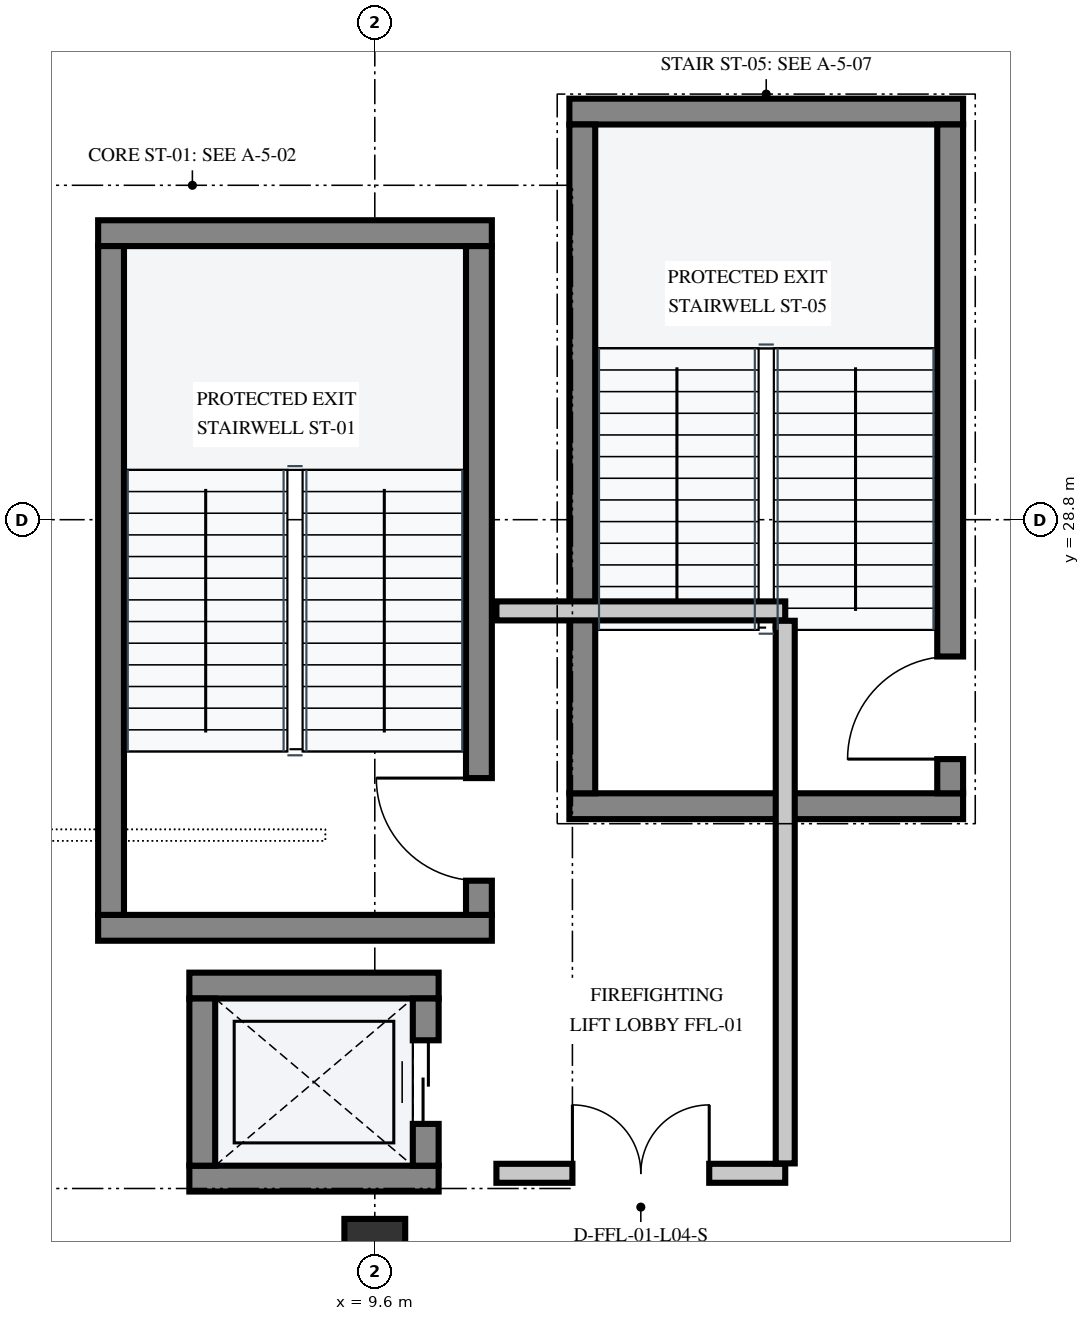
"""IFC4 building model, lengths in metres.
Left out: names, types, materials, properties, quantities, classifications, styles, units other than length and angle.
Written with IfcOpenShell. Run it as: python <this file> out.ifc"""

import sys

from ifc_helpers import new_model, si_unit, direction, frame, frame_2d, origin, origin_2d, place, context, subcontext, project, spatial, rectangle, extrude, element, fill, save


model = new_model("IFC4")
c1 = context("Model", 3, precision=1e-05, world=origin(), true_north=direction((0.0, 1.0)))
c2 = subcontext(c1, "Body", "Model", "MODEL_VIEW")
j1 = project(units=[si_unit("LENGTHUNIT", "METRE"), si_unit("PLANEANGLEUNIT", "RADIAN")], contexts=[c1])
p1 = place(None, origin())
s1 = spatial("IfcSite", under=j1, at=p1, CompositionType="ELEMENT")
p2 = place(p1, origin())
s2 = spatial("IfcBuilding", under=s1, at=p2, CompositionType="ELEMENT")
p3 = place(p2, frame((0.0, 0.0, 19.8)))
s3 = spatial("IfcBuildingStorey", under=s2, at=p3, CompositionType="ELEMENT", Elevation=19.8)
p4 = place(p3, frame((9.6, 19.2, 0.0), z_axis=(0.0, 0.0, 1.0), x_axis=(1.0, 0.0, 0.0)))
e1 = element("IfcColumn", 1, at=p4, inside=s3, PredefinedType="COLUMN", context=c2, shape_type="SweptSolid", body=[
    extrude(rectangle(XDim=0.8, YDim=0.8, at=origin_2d()), origin(), (0.0, 0.0, 1.0), 4.8),
])
for number, where, z_axis, x_axis in (
    (2, (5.96, 23.43, 0.0), (0.0, 0.0, 1.0), (1.0, 0.0, 0.0)),
    (3, (5.96, 32.57, 0.0), (0.0, 0.0, 1.0), (1.0, 0.0, 0.0)),
):
    element("IfcWall", number, at=place(p3, frame(where, z_axis=z_axis, x_axis=x_axis)), inside=s3, PredefinedType="SHEAR", context=c2, shape_type="SweptSolid", body=[
        extrude(rectangle(XDim=5.18, YDim=0.34, at=frame_2d((2.59, 0.0))), origin(), (0.0, 0.0, 1.0), 4.48),
    ])
p5 = place(p3, frame((10.97, 23.6, 0.0), z_axis=(0.0, 0.0, 1.0), x_axis=(0.0, 1.0, 0.0)))
e4 = element("IfcWall", 4, at=p5, inside=s3, PredefinedType="SHEAR", context=c2, shape_type="SweptSolid", body=[
    extrude(rectangle(XDim=8.8, YDim=0.34, at=frame_2d((4.4, 0.0))), origin(), (0.0, 0.0, 1.0), 4.48),
])
p6 = place(p5, frame((0.45, 0.0, 0.0)))
e5 = element("IfcOpeningElement", 5, at=p6, cuts=e4, PredefinedType="OPENING", context=c2, shape_type="SweptSolid", body=[
    extrude(rectangle(XDim=1.35, YDim=2.2, at=frame_2d((0.675, 1.1))), frame((0.0, 0.182, 0.0), z_axis=(0.0, -1.0, 0.0), x_axis=(1.0, 0.0, 0.0)), (0.0, 0.0, 1.0), 0.364),
])
p7 = place(p3, frame((6.13, 23.6, 0.0), z_axis=(0.0, 0.0, 1.0), x_axis=(0.0, 1.0, 0.0)))
e6 = element("IfcWall", 6, at=p7, inside=s3, PredefinedType="SHEAR", context=c2, shape_type="SweptSolid", body=[
    extrude(rectangle(XDim=8.8, YDim=0.34, at=frame_2d((4.4, 0.0))), origin(), (0.0, 0.0, 1.0), 4.48),
])
for number, where, z_axis, x_axis in (
    (7, (12.16, 25.03, 0.0), (0.0, 0.0, 1.0), (1.0, 0.0, 0.0)),
    (8, (12.16, 34.17, 0.0), (0.0, 0.0, 1.0), (1.0, 0.0, 0.0)),
):
    element("IfcWall", number, at=place(p3, frame(where, z_axis=z_axis, x_axis=x_axis)), inside=s3, PredefinedType="SHEAR", context=c2, shape_type="SweptSolid", body=[
        extrude(rectangle(XDim=5.18, YDim=0.34, at=frame_2d((2.59, 0.0))), origin(), (0.0, 0.0, 1.0), 4.48),
    ])
p8 = place(p3, frame((17.17, 25.2, 0.0), z_axis=(0.0, 0.0, 1.0), x_axis=(0.0, 1.0, 0.0)))
e9 = element("IfcWall", 9, at=p8, inside=s3, PredefinedType="SHEAR", context=c2, shape_type="SweptSolid", body=[
    extrude(rectangle(XDim=8.8, YDim=0.34, at=frame_2d((4.4, 0.0))), origin(), (0.0, 0.0, 1.0), 4.48),
])
p9 = place(p8, frame((0.45, 0.0, 0.0)))
e10 = element("IfcOpeningElement", 10, at=p9, cuts=e9, PredefinedType="OPENING", context=c2, shape_type="SweptSolid", body=[
    extrude(rectangle(XDim=1.35, YDim=2.2, at=frame_2d((0.675, 1.1))), frame((0.0, 0.182, 0.0), z_axis=(0.0, -1.0, 0.0), x_axis=(1.0, 0.0, 0.0)), (0.0, 0.0, 1.0), 0.364),
])
p10 = place(p3, frame((12.33, 25.2, 0.0), z_axis=(0.0, 0.0, 1.0), x_axis=(0.0, 1.0, 0.0)))
e11 = element("IfcWall", 11, at=p10, inside=s3, PredefinedType="SHEAR", context=c2, shape_type="SweptSolid", body=[
    extrude(rectangle(XDim=8.8, YDim=0.34, at=frame_2d((4.4, 0.0))), origin(), (0.0, 0.0, 1.0), 4.48),
])
for number, where, z_axis, x_axis in (
    (12, (7.16, 20.13, 0.0), (0.0, 0.0, 1.0), (1.0, 0.0, 0.0)),
    (13, (7.16, 22.67, 0.0), (0.0, 0.0, 1.0), (1.0, 0.0, 0.0)),
):
    element("IfcWall", number, at=place(p3, frame(where, z_axis=z_axis, x_axis=x_axis)), inside=s3, PredefinedType="SHEAR", context=c2, shape_type="SweptSolid", body=[
        extrude(rectangle(XDim=3.28, YDim=0.34, at=frame_2d((1.64, 0.0))), origin(), (0.0, 0.0, 1.0), 4.48),
    ])
p11 = place(p3, frame((7.33, 20.3, 0.0), z_axis=(0.0, 0.0, 1.0), x_axis=(0.0, 1.0, 0.0)))
e14 = element("IfcWall", 14, at=p11, inside=s3, PredefinedType="SHEAR", context=c2, shape_type="SweptSolid", body=[
    extrude(rectangle(XDim=2.2, YDim=0.34, at=frame_2d((1.1, 0.0))), origin(), (0.0, 0.0, 1.0), 4.48),
])
p12 = place(p3, frame((10.27, 20.3, 0.0), z_axis=(0.0, 0.0, 1.0), x_axis=(0.0, 1.0, 0.0)))
e15 = element("IfcWall", 15, at=p12, inside=s3, PredefinedType="SHEAR", context=c2, shape_type="SweptSolid", body=[
    extrude(rectangle(XDim=2.2, YDim=0.34, at=frame_2d((1.1, 0.0))), origin(), (0.0, 0.0, 1.0), 4.48),
])
p13 = place(p12, frame((0.55, 0.0, 0.0)))
e16 = element("IfcOpeningElement", 16, at=p13, cuts=e15, PredefinedType="OPENING", context=c2, shape_type="SweptSolid", body=[
    extrude(rectangle(XDim=1.1, YDim=2.15, at=frame_2d((0.55, 1.075))), frame((0.0, 0.182, 0.0), z_axis=(0.0, -1.0, 0.0), x_axis=(1.0, 0.0, 0.0)), (0.0, 0.0, 1.0), 0.364),
])
p14 = place(p3, frame((11.2, 20.2, 0.0), z_axis=(0.0, 0.0, 1.0), x_axis=(1.0, 0.0, 0.0)))
e17 = element("IfcWall", 17, at=p14, inside=s3, PredefinedType="PARTITIONING", context=c2, shape_type="SweptSolid", body=[
    extrude(rectangle(XDim=3.8, YDim=0.25, at=frame_2d((1.9, 0.0))), origin(), (0.0, 0.0, 1.0), 4.48),
])
p15 = place(p14, frame((1.0, 0.0, 0.0)))
e18 = element("IfcOpeningElement", 18, at=p15, cuts=e17, PredefinedType="OPENING", context=c2, shape_type="SweptSolid", body=[
    extrude(rectangle(XDim=1.8, YDim=2.25, at=frame_2d((0.9, 1.125))), frame((0.0, 0.137, 0.0), z_axis=(0.0, -1.0, 0.0), x_axis=(1.0, 0.0, 0.0)), (0.0, 0.0, 1.0), 0.274),
])
p16 = place(p3, frame((11.2, 27.6, 0.0), z_axis=(0.0, 0.0, 1.0), x_axis=(1.0, 0.0, 0.0)))
e19 = element("IfcWall", 19, at=p16, inside=s3, PredefinedType="PARTITIONING", context=c2, shape_type="SweptSolid", body=[
    extrude(rectangle(XDim=3.8, YDim=0.25, at=frame_2d((1.9, 0.0))), origin(), (0.0, 0.0, 1.0), 4.48),
])
p17 = place(p3, frame((15.0, 20.33, 0.0), z_axis=(0.0, 0.0, 1.0), x_axis=(0.0, 1.0, 0.0)))
e20 = element("IfcWall", 20, at=p17, inside=s3, PredefinedType="PARTITIONING", context=c2, shape_type="SweptSolid", body=[
    extrude(rectangle(XDim=7.14, YDim=0.25, at=frame_2d((3.57, 0.0))), origin(), (0.0, 0.0, 1.0), 4.48),
])
p18 = place(p6, origin())
e21 = element("IfcDoor", 21, at=p18, inside=s3, OperationType="SINGLE_SWING_RIGHT", PredefinedType="DOOR", context=c2, shape_type="SweptSolid", body=[
    extrude(rectangle(XDim=1.35, YDim=2.2, at=frame_2d((0.675, 1.1))), frame((0.0, 0.025, 0.0), z_axis=(0.0, -1.0, 0.0), x_axis=(1.0, 0.0, 0.0)), (0.0, 0.0, 1.0), 0.05),
])
fill(e5, e21)
p19 = place(p9, origin())
e22 = element("IfcDoor", 22, at=p19, inside=s3, OperationType="SINGLE_SWING_LEFT", PredefinedType="DOOR", context=c2, shape_type="SweptSolid", body=[
    extrude(rectangle(XDim=1.35, YDim=2.2, at=frame_2d((0.675, 1.1))), frame((0.0, 0.025, 0.0), z_axis=(0.0, -1.0, 0.0), x_axis=(1.0, 0.0, 0.0)), (0.0, 0.0, 1.0), 0.05),
])
fill(e10, e22)
p20 = place(p13, origin())
e23 = element("IfcDoor", 23, at=p20, inside=s3, OperationType="DOUBLE_DOOR_SLIDING", PredefinedType="DOOR", context=c2, shape_type="SweptSolid", body=[
    extrude(rectangle(XDim=1.1, YDim=2.15, at=frame_2d((0.55, 1.075))), frame((0.0, 0.025, 0.0), z_axis=(0.0, -1.0, 0.0), x_axis=(1.0, 0.0, 0.0)), (0.0, 0.0, 1.0), 0.05),
])
fill(e16, e23)
p21 = place(p15, origin())
e24 = element("IfcDoor", 24, at=p21, inside=s3, OperationType="DOUBLE_DOOR_SINGLE_SWING", PredefinedType="DOOR", context=c2, shape_type="SweptSolid", body=[
    extrude(rectangle(XDim=1.8, YDim=2.25, at=frame_2d((0.9, 1.125))), frame((0.0, 0.025, 0.0), z_axis=(0.0, -1.0, 0.0), x_axis=(1.0, 0.0, 0.0)), (0.0, 0.0, 1.0), 0.05),
])
fill(e18, e24)
save(model, sys.argv[1])
